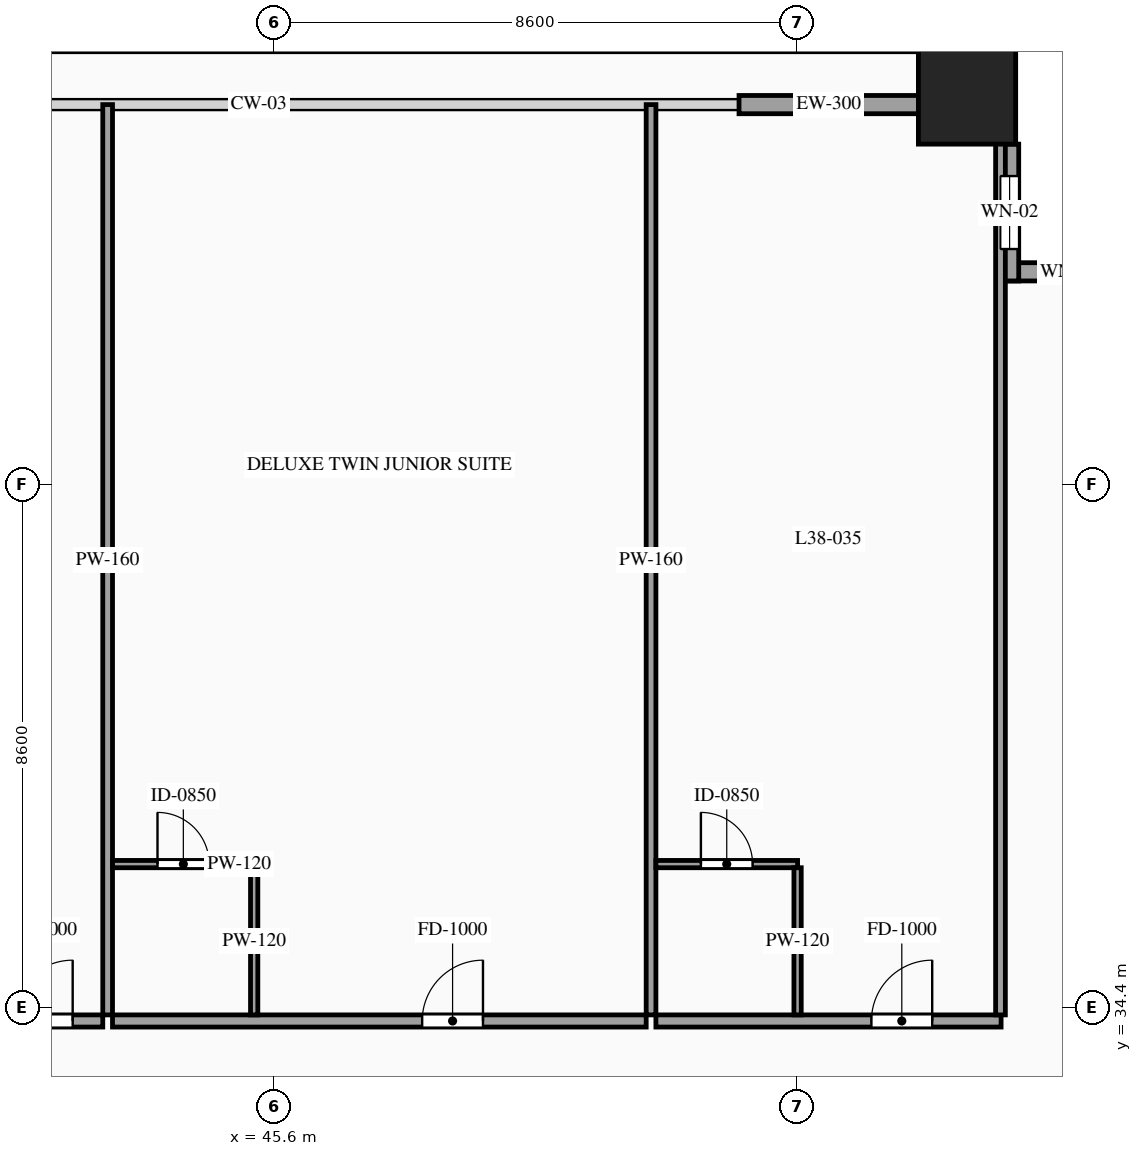
"""IFC4 building model, lengths in metres.
Left out: names, types, materials, properties, quantities, classifications, styles, units other than length and angle.
Written with IfcOpenShell. Run it as: python <this file> out.ifc"""

import sys

from ifc_helpers import new_model, si_unit, direction, frame, frame_2d, origin, origin_2d, place, context, subcontext, project, spatial, rectangle, hollow_rectangle, extrude, source, transform, mapped, element, fill, save


model = new_model("IFC4")
c1 = context("Model", 3, precision=1e-05, world=origin(), true_north=direction((0.0, 1.0)))
c2 = subcontext(c1, "Body", "Model", "MODEL_VIEW")
j1 = project(units=[si_unit("LENGTHUNIT", "METRE"), si_unit("PLANEANGLEUNIT", "RADIAN")], contexts=[c1])
p1 = place(None, origin())
s1 = spatial("IfcSite", under=j1, at=p1, CompositionType="ELEMENT")
p2 = place(p1, origin())
s2 = spatial("IfcBuilding", under=s1, at=p2, CompositionType="ELEMENT")
p3 = place(p2, frame((0.0, 0.0, 145.2)))
s3 = spatial("IfcBuildingStorey", under=s2, at=p3, CompositionType="ELEMENT", Elevation=145.2)
m1 = source(origin(), c2, "Body", "SweptSolid", [
    extrude(hollow_rectangle(XDim=1.6, YDim=1.6, WallThickness=0.07, at=origin_2d()), origin(), (0.0, 0.0, 1.0), 3.6),
])
p4 = place(p3, frame((57.0, 49.4, 0.0), z_axis=(0.0, 0.0, 1.0), x_axis=(1.0, 0.0, 0.0)))
e1 = element("IfcColumn", 1, at=p4, inside=s3, PredefinedType="COLUMN", context=c2, shape_type="MappedRepresentation", body=[
    mapped(m1, transform((0.0, 0.0, 0.0), scale=1.0)),
])
p5 = place(p3, frame((59.8, 46.5, 0.0), z_axis=(0.0, 0.0, 1.0), x_axis=(-1.0, 0.0, 0.0)))
e2 = element("IfcWall", 2, at=p5, inside=s3, PredefinedType="SOLIDWALL", context=c2, shape_type="SweptSolid", body=[
    extrude(rectangle(XDim=2.25, YDim=0.3, at=frame_2d((1.125, 0.0))), origin(), (0.0, 0.0, 1.0), 3.38),
])
p6 = place(p5, frame((0.675, 0.0, 0.85)))
e3 = element("IfcOpeningElement", 3, at=p6, cuts=e2, PredefinedType="OPENING", context=c2, shape_type="SweptSolid", body=[
    extrude(rectangle(XDim=0.9, YDim=1.5, at=frame_2d((0.45, 0.75))), frame((0.0, 0.165, 0.0), z_axis=(0.0, -1.0, 0.0), x_axis=(1.0, 0.0, 0.0)), (0.0, 0.0, 1.0), 0.33),
])
p7 = place(p3, frame((57.7, 46.35, 0.0), z_axis=(0.0, 0.0, 1.0), x_axis=(0.0, 1.0, 0.0)))
e4 = element("IfcWall", 4, at=p7, inside=s3, PredefinedType="SOLIDWALL", context=c2, shape_type="SweptSolid", body=[
    extrude(rectangle(XDim=2.25, YDim=0.3, at=frame_2d((1.125, 0.0))), origin(), (0.0, 0.0, 1.0), 3.38),
])
p8 = place(p7, frame((0.525, 0.0, 0.85)))
e5 = element("IfcOpeningElement", 5, at=p8, cuts=e4, PredefinedType="OPENING", context=c2, shape_type="SweptSolid", body=[
    extrude(rectangle(XDim=1.2, YDim=2.1, at=frame_2d((0.6, 1.05))), frame((0.0, 0.165, 0.0), z_axis=(0.0, -1.0, 0.0), x_axis=(1.0, 0.0, 0.0)), (0.0, 0.0, 1.0), 0.33),
])
m2 = source(origin(), c2, "Body", "SweptSolid", [
    extrude(rectangle(XDim=2.95, YDim=0.3, at=frame_2d((1.475, 0.0))), origin(), (0.0, 0.0, 1.0), 2.775),
])
p9 = place(p3, frame((53.25, 49.25, 0.0), z_axis=(0.0, 0.0, 1.0), x_axis=(1.0, 0.0, 0.0)))
e6 = element("IfcWall", 6, at=p9, inside=s3, PredefinedType="SOLIDWALL", context=c2, shape_type="MappedRepresentation", body=[
    mapped(m2, transform((0.0, 0.0, 0.0), scale=1.0)),
])
p10 = place(p3, frame((38.725, 34.18, 0.0), z_axis=(0.0, 0.0, 1.0), x_axis=(1.0, 0.0, 0.0)))
e7 = element("IfcWall", 7, at=p10, inside=s3, PredefinedType="PARTITIONING", context=c2, shape_type="SweptSolid", body=[
    extrude(rectangle(XDim=4.061, YDim=0.2, at=frame_2d((2.03, 0.0))), origin(), (0.0, 0.0, 1.0), 3.38),
])
p11 = place(p10, frame((2.566, 0.0, 0.0)))
e8 = element("IfcOpeningElement", 8, at=p11, cuts=e7, PredefinedType="OPENING", context=c2, shape_type="SweptSolid", body=[
    extrude(rectangle(XDim=1.0, YDim=2.2, at=frame_2d((0.5, 1.1))), frame((0.0, 0.115, 0.0), z_axis=(0.0, -1.0, 0.0), x_axis=(1.0, 0.0, 0.0)), (0.0, 0.0, 1.0), 0.23),
])
m3 = source(origin(), c2, "Body", "SweptSolid", [
    extrude(rectangle(XDim=14.97, YDim=0.16, at=frame_2d((7.485, 0.0))), origin(), (0.0, 0.0, 1.0), 3.38),
])
p12 = place(p3, frame((42.866, 34.28, 0.0), z_axis=(0.0, 0.0, 1.0), x_axis=(0.0, 1.0, 0.0)))
e9 = element("IfcWall", 9, at=p12, inside=s3, PredefinedType="PARTITIONING", context=c2, shape_type="MappedRepresentation", body=[
    mapped(m3, transform((0.0, 0.0, 0.0), scale=1.0)),
])
p13 = place(p3, frame((42.946, 34.18, 0.0), z_axis=(0.0, 0.0, 1.0), x_axis=(1.0, 0.0, 0.0)))
e10 = element("IfcWall", 10, at=p13, inside=s3, PredefinedType="PARTITIONING", context=c2, shape_type="SweptSolid", body=[
    extrude(rectangle(XDim=8.777, YDim=0.2, at=frame_2d((4.388, 0.0))), origin(), (0.0, 0.0, 1.0), 3.38),
])
p14 = place(p13, frame((5.093, 0.0, 0.0)))
e11 = element("IfcOpeningElement", 11, at=p14, cuts=e10, PredefinedType="OPENING", context=c2, shape_type="SweptSolid", body=[
    extrude(rectangle(XDim=1.0, YDim=2.2, at=frame_2d((0.5, 1.1))), frame((0.0, 0.115, 0.0), z_axis=(0.0, -1.0, 0.0), x_axis=(1.0, 0.0, 0.0)), (0.0, 0.0, 1.0), 0.23),
])
p15 = place(p3, frame((51.803, 34.28, 0.0), z_axis=(0.0, 0.0, 1.0), x_axis=(0.0, 1.0, 0.0)))
e12 = element("IfcWall", 12, at=p15, inside=s3, PredefinedType="PARTITIONING", context=c2, shape_type="MappedRepresentation", body=[
    mapped(m3, transform((0.0, 0.0, 0.0), scale=1.0)),
])
p16 = place(p3, frame((42.946, 36.76, 0.0), z_axis=(0.0, 0.0, 1.0), x_axis=(1.0, 0.0, 0.0)))
e13 = element("IfcWall", 13, at=p16, inside=s3, PredefinedType="PARTITIONING", context=c2, shape_type="SweptSolid", body=[
    extrude(rectangle(XDim=2.33, YDim=0.12, at=frame_2d((1.165, 0.0))), origin(), (0.0, 0.0, 1.0), 3.38),
])
p17 = place(p16, frame((0.74, 0.0, 0.0)))
e14 = element("IfcOpeningElement", 14, at=p17, cuts=e13, PredefinedType="OPENING", context=c2, shape_type="SweptSolid", body=[
    extrude(rectangle(XDim=0.85, YDim=2.1, at=frame_2d((0.425, 1.05))), frame((0.0, 0.075, 0.0), z_axis=(0.0, -1.0, 0.0), x_axis=(1.0, 0.0, 0.0)), (0.0, 0.0, 1.0), 0.15),
])
m4 = source(origin(), c2, "Body", "SweptSolid", [
    extrude(rectangle(XDim=2.42, YDim=0.12, at=frame_2d((1.21, 0.0))), origin(), (0.0, 0.0, 1.0), 3.38),
])
p18 = place(p3, frame((45.276, 34.28, 0.0), z_axis=(0.0, 0.0, 1.0), x_axis=(0.0, 1.0, 0.0)))
e15 = element("IfcWall", 15, at=p18, inside=s3, PredefinedType="PARTITIONING", context=c2, shape_type="MappedRepresentation", body=[
    mapped(m4, transform((0.0, 0.0, 0.0), scale=1.0)),
])
p19 = place(p3, frame((51.883, 34.18, 0.0), z_axis=(0.0, 0.0, 1.0), x_axis=(1.0, 0.0, 0.0)))
e16 = element("IfcWall", 16, at=p19, inside=s3, PredefinedType="PARTITIONING", context=c2, shape_type="SweptSolid", body=[
    extrude(rectangle(XDim=5.677, YDim=0.2, at=frame_2d((2.838, 0.0))), origin(), (0.0, 0.0, 1.0), 3.38),
])
p20 = place(p19, frame((3.544, 0.0, 0.0)))
e17 = element("IfcOpeningElement", 17, at=p20, cuts=e16, PredefinedType="OPENING", context=c2, shape_type="SweptSolid", body=[
    extrude(rectangle(XDim=1.0, YDim=2.2, at=frame_2d((0.5, 1.1))), frame((0.0, 0.115, 0.0), z_axis=(0.0, -1.0, 0.0), x_axis=(1.0, 0.0, 0.0)), (0.0, 0.0, 1.0), 0.23),
])
m5 = source(origin(), c2, "Body", "SweptSolid", [
    extrude(rectangle(XDim=14.82, YDim=0.16, at=frame_2d((7.41, 0.0))), origin(), (0.0, 0.0, 1.0), 3.38),
])
p21 = place(p3, frame((57.55, 34.28, 0.0), z_axis=(0.0, 0.0, 1.0), x_axis=(0.0, 1.0, 0.0)))
e18 = element("IfcWall", 18, at=p21, inside=s3, PredefinedType="PARTITIONING", context=c2, shape_type="MappedRepresentation", body=[
    mapped(m5, transform((0.0, 0.0, 0.0), scale=1.0)),
])
p22 = place(p3, frame((51.883, 36.76, 0.0), z_axis=(0.0, 0.0, 1.0), x_axis=(1.0, 0.0, 0.0)))
e19 = element("IfcWall", 19, at=p22, inside=s3, PredefinedType="PARTITIONING", context=c2, shape_type="SweptSolid", body=[
    extrude(rectangle(XDim=2.33, YDim=0.12, at=frame_2d((1.165, 0.0))), origin(), (0.0, 0.0, 1.0), 3.38),
])
p23 = place(p22, frame((0.74, 0.0, 0.0)))
e20 = element("IfcOpeningElement", 20, at=p23, cuts=e19, PredefinedType="OPENING", context=c2, shape_type="SweptSolid", body=[
    extrude(rectangle(XDim=0.85, YDim=2.1, at=frame_2d((0.425, 1.05))), frame((0.0, 0.075, 0.0), z_axis=(0.0, -1.0, 0.0), x_axis=(1.0, 0.0, 0.0)), (0.0, 0.0, 1.0), 0.15),
])
p24 = place(p3, frame((54.213, 34.28, 0.0), z_axis=(0.0, 0.0, 1.0), x_axis=(0.0, 1.0, 0.0)))
e21 = element("IfcWall", 21, at=p24, inside=s3, PredefinedType="PARTITIONING", context=c2, shape_type="MappedRepresentation", body=[
    mapped(m4, transform((0.0, 0.0, 0.0), scale=1.0)),
])
m6 = source(origin(), c2, "Body", "SweptSolid", [
    extrude(rectangle(XDim=0.9, YDim=1.5, at=frame_2d((0.45, 0.75))), frame((0.0, 0.03, 0.0), z_axis=(0.0, -1.0, 0.0), x_axis=(1.0, 0.0, 0.0)), (0.0, 0.0, 1.0), 0.06),
])
p25 = place(p6, origin())
e22 = element("IfcWindow", 22, at=p25, inside=s3, PartitioningType="SINGLE_PANEL", PredefinedType="WINDOW", context=c2, shape_type="MappedRepresentation", body=[
    mapped(m6, transform((0.0, 0.0, 0.0), scale=1.0)),
])
fill(e3, e22)
m7 = source(origin(), c2, "Body", "SweptSolid", [
    extrude(rectangle(XDim=1.2, YDim=2.1, at=frame_2d((0.6, 1.05))), frame((0.0, 0.03, 0.0), z_axis=(0.0, -1.0, 0.0), x_axis=(1.0, 0.0, 0.0)), (0.0, 0.0, 1.0), 0.06),
])
p26 = place(p8, origin())
e23 = element("IfcWindow", 23, at=p26, inside=s3, PartitioningType="SINGLE_PANEL", PredefinedType="WINDOW", context=c2, shape_type="MappedRepresentation", body=[
    mapped(m7, transform((0.0, 0.0, 0.0), scale=1.0)),
])
fill(e5, e23)
m8 = source(origin(), c2, "Body", "SweptSolid", [
    extrude(rectangle(XDim=1.0, YDim=2.2, at=frame_2d((0.5, 1.1))), frame((0.0, 0.025, 0.0), z_axis=(0.0, -1.0, 0.0), x_axis=(1.0, 0.0, 0.0)), (0.0, 0.0, 1.0), 0.05),
])
p27 = place(p11, origin())
e24 = element("IfcDoor", 24, at=p27, inside=s3, OperationType="SINGLE_SWING_RIGHT", PredefinedType="DOOR", context=c2, shape_type="MappedRepresentation", body=[
    mapped(m8, transform((0.0, 0.0, 0.0), scale=1.0)),
])
fill(e8, e24)
p28 = place(p14, origin())
e25 = element("IfcDoor", 25, at=p28, inside=s3, OperationType="SINGLE_SWING_RIGHT", PredefinedType="DOOR", context=c2, shape_type="MappedRepresentation", body=[
    mapped(m8, transform((0.0, 0.0, 0.0), scale=1.0)),
])
fill(e11, e25)
m9 = source(origin(), c2, "Body", "SweptSolid", [
    extrude(rectangle(XDim=0.85, YDim=2.1, at=frame_2d((0.425, 1.05))), frame((0.0, 0.025, 0.0), z_axis=(0.0, -1.0, 0.0), x_axis=(1.0, 0.0, 0.0)), (0.0, 0.0, 1.0), 0.05),
])
p29 = place(p17, origin())
e26 = element("IfcDoor", 26, at=p29, inside=s3, OperationType="SINGLE_SWING_LEFT", PredefinedType="DOOR", context=c2, shape_type="MappedRepresentation", body=[
    mapped(m9, transform((0.0, 0.0, 0.0), scale=1.0)),
])
fill(e14, e26)
p30 = place(p20, origin())
e27 = element("IfcDoor", 27, at=p30, inside=s3, OperationType="SINGLE_SWING_RIGHT", PredefinedType="DOOR", context=c2, shape_type="MappedRepresentation", body=[
    mapped(m8, transform((0.0, 0.0, 0.0), scale=1.0)),
])
fill(e17, e27)
p31 = place(p23, origin())
e28 = element("IfcDoor", 28, at=p31, inside=s3, OperationType="SINGLE_SWING_LEFT", PredefinedType="DOOR", context=c2, shape_type="MappedRepresentation", body=[
    mapped(m9, transform((0.0, 0.0, 0.0), scale=1.0)),
])
fill(e20, e28)
save(model, sys.argv[1])
